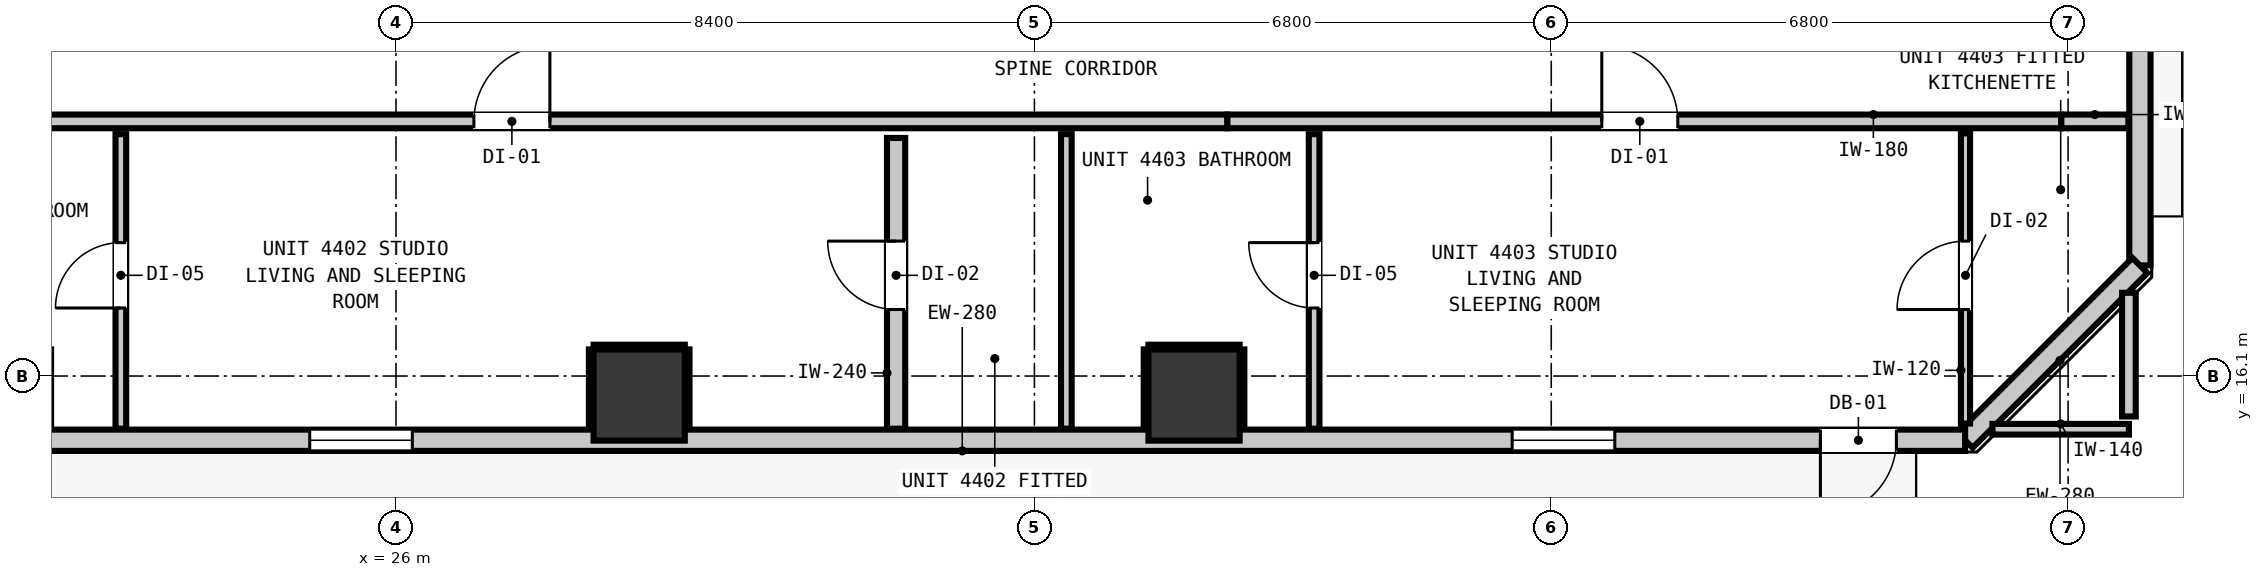
"""IFC4 building model, lengths in metres.
Left out: names, types, materials, properties, quantities, classifications, styles, units other than length and angle.
Written with IfcOpenShell. Run it as: python <this file> out.ifc"""

import sys

from ifc_helpers import new_model, si_unit, direction, frame, frame_2d, origin, origin_2d, place, context, subcontext, project, spatial, rectangle, extrude, element, fill, save


model = new_model("IFC4")
c1 = context("Model", 3, precision=1e-05, world=origin(), true_north=direction((0.0, 1.0)))
c2 = subcontext(c1, "Body", "Model", "MODEL_VIEW")
j1 = project(units=[si_unit("LENGTHUNIT", "METRE"), si_unit("PLANEANGLEUNIT", "RADIAN")], contexts=[c1])
p1 = place(None, origin())
s1 = spatial("IfcSite", under=j1, at=p1, CompositionType="ELEMENT")
p2 = place(p1, origin())
s2 = spatial("IfcBuilding", under=s1, at=p2, CompositionType="ELEMENT")
p3 = place(p2, frame((0.0, 0.0, 152.56)))
s3 = spatial("IfcBuildingStorey", under=s2, at=p3, CompositionType="ELEMENT", Elevation=152.56)
for number, where, z_axis, x_axis in (
    (1, (29.2, 15.85, 0.0), (0.0, 0.0, 1.0), (1.0, 0.0, 0.0)),
    (2, (36.5, 15.85, 0.0), (0.0, 0.0, 1.0), (1.0, 0.0, 0.0)),
):
    element("IfcColumn", number, at=place(p3, frame(where, z_axis=z_axis, x_axis=x_axis)), inside=s3, PredefinedType="COLUMN", context=c2, shape_type="SweptSolid", body=[
        extrude(rectangle(XDim=1.2, YDim=1.2, at=origin_2d()), origin(), (0.0, 0.0, 1.0), 3.32),
    ])
p4 = place(p3, frame((48.945, 49.845, 0.0), z_axis=(0.0, 0.0, 1.0), x_axis=(0.0, -1.0, 0.0)))
e3 = element("IfcWall", 3, at=p4, inside=s3, PredefinedType="STANDARD", context=c2, shape_type="SweptSolid", body=[
    extrude(rectangle(XDim=32.29, YDim=0.28, at=frame_2d((16.145, 0.0))), origin(), (0.0, 0.0, 1.0), 3.08),
])
p5 = place(p4, frame((0.904, 0.0, 0.0)))
e4 = element("IfcOpeningElement", 4, at=p5, cuts=e3, PredefinedType="OPENING", context=c2, shape_type="SweptSolid", body=[
    extrude(rectangle(XDim=1.0, YDim=2.15, at=frame_2d((0.5, 1.075))), frame((0.0, 0.15, 0.0), z_axis=(0.0, -1.0, 0.0), x_axis=(1.0, 0.0, 0.0)), (0.0, 0.0, 1.0), 0.3),
])
p6 = place(p4, frame((2.924, 0.0, 0.85)))
e5 = element("IfcOpeningElement", 5, at=p6, cuts=e3, PredefinedType="OPENING", context=c2, shape_type="SweptSolid", body=[
    extrude(rectangle(XDim=1.35, YDim=1.85, at=frame_2d((0.675, 0.925))), frame((0.0, 0.15, 0.0), z_axis=(0.0, -1.0, 0.0), x_axis=(1.0, 0.0, 0.0)), (0.0, 0.0, 1.0), 0.3),
])
p7 = place(p4, frame((21.186, 0.0, 0.85)))
e6 = element("IfcOpeningElement", 6, at=p7, cuts=e3, PredefinedType="OPENING", context=c2, shape_type="SweptSolid", body=[
    extrude(rectangle(XDim=1.35, YDim=1.85, at=frame_2d((0.675, 0.925))), frame((0.0, 0.15, 0.0), z_axis=(0.0, -1.0, 0.0), x_axis=(1.0, 0.0, 0.0)), (0.0, 0.0, 1.0), 0.3),
])
p8 = place(p4, frame((12.195, 0.0, 0.85)))
e7 = element("IfcOpeningElement", 7, at=p8, cuts=e3, PredefinedType="OPENING", context=c2, shape_type="SweptSolid", body=[
    extrude(rectangle(XDim=1.35, YDim=1.85, at=frame_2d((0.675, 0.925))), frame((0.0, 0.15, 0.0), z_axis=(0.0, -1.0, 0.0), x_axis=(1.0, 0.0, 0.0)), (0.0, 0.0, 1.0), 0.3),
])
p9 = place(p3, frame((48.945, 17.555, 0.0), z_axis=(0.0, 0.0, 1.0), x_axis=(-0.707106781187, -0.707106781187, 0.0)))
e8 = element("IfcWall", 8, at=p9, inside=s3, PredefinedType="STANDARD", context=c2, shape_type="SweptSolid", body=[
    extrude(rectangle(XDim=3.253, YDim=0.28, at=frame_2d((1.626, 0.0))), origin(), (0.0, 0.0, 1.0), 3.08),
])
p10 = place(p3, frame((46.645, 15.255, 0.0), z_axis=(0.0, 0.0, 1.0), x_axis=(-1.0, 0.0, 0.0)))
e9 = element("IfcWall", 9, at=p10, inside=s3, PredefinedType="STANDARD", context=c2, shape_type="SweptSolid", body=[
    extrude(rectangle(XDim=35.09, YDim=0.28, at=frame_2d((17.545, 0.0))), origin(), (0.0, 0.0, 1.0), 3.08),
])
p11 = place(p10, frame((0.904, 0.0, 0.0)))
e10 = element("IfcOpeningElement", 10, at=p11, cuts=e9, PredefinedType="OPENING", context=c2, shape_type="SweptSolid", body=[
    extrude(rectangle(XDim=1.0, YDim=2.15, at=frame_2d((0.5, 1.075))), frame((0.0, 0.15, 0.0), z_axis=(0.0, -1.0, 0.0), x_axis=(1.0, 0.0, 0.0)), (0.0, 0.0, 1.0), 0.3),
])
p12 = place(p10, frame((30.535, 0.0, 0.85)))
e11 = element("IfcOpeningElement", 11, at=p12, cuts=e9, PredefinedType="OPENING", context=c2, shape_type="SweptSolid", body=[
    extrude(rectangle(XDim=1.35, YDim=1.85, at=frame_2d((0.675, 0.925))), frame((0.0, 0.15, 0.0), z_axis=(0.0, -1.0, 0.0), x_axis=(1.0, 0.0, 0.0)), (0.0, 0.0, 1.0), 0.3),
])
p13 = place(p10, frame((20.43, 0.0, 0.85)))
e12 = element("IfcOpeningElement", 12, at=p13, cuts=e9, PredefinedType="OPENING", context=c2, shape_type="SweptSolid", body=[
    extrude(rectangle(XDim=1.35, YDim=1.85, at=frame_2d((0.675, 0.925))), frame((0.0, 0.15, 0.0), z_axis=(0.0, -1.0, 0.0), x_axis=(1.0, 0.0, 0.0)), (0.0, 0.0, 1.0), 0.3),
])
p14 = place(p10, frame((4.609, 0.0, 0.85)))
e13 = element("IfcOpeningElement", 13, at=p14, cuts=e9, PredefinedType="OPENING", context=c2, shape_type="SweptSolid", body=[
    extrude(rectangle(XDim=1.35, YDim=1.85, at=frame_2d((0.675, 0.925))), frame((0.0, 0.15, 0.0), z_axis=(0.0, -1.0, 0.0), x_axis=(1.0, 0.0, 0.0)), (0.0, 0.0, 1.0), 0.3),
])
p15 = place(p3, frame((9.407, 19.45, 0.0), z_axis=(0.0, 0.0, 1.0), x_axis=(1.0, 0.0, 0.0)))
e14 = element("IfcWall", 14, at=p15, inside=s3, PredefinedType="PARTITIONING", context=c2, shape_type="SweptSolid", body=[
    extrude(rectangle(XDim=27.532, YDim=0.18, at=frame_2d((13.766, 0.0))), origin(), (0.0, 0.0, 1.0), 3.08),
])
p16 = place(p15, frame((4.303, 0.0, 0.0)))
e15 = element("IfcOpeningElement", 15, at=p16, cuts=e14, PredefinedType="OPENING", context=c2, shape_type="SweptSolid", body=[
    extrude(rectangle(XDim=1.0, YDim=2.15, at=frame_2d((0.5, 1.075))), frame((0.0, 0.1, 0.0), z_axis=(0.0, -1.0, 0.0), x_axis=(1.0, 0.0, 0.0)), (0.0, 0.0, 1.0), 0.2),
])
p17 = place(p15, frame((17.618, 0.0, 0.0)))
e16 = element("IfcOpeningElement", 16, at=p17, cuts=e14, PredefinedType="OPENING", context=c2, shape_type="SweptSolid", body=[
    extrude(rectangle(XDim=1.0, YDim=2.15, at=frame_2d((0.5, 1.075))), frame((0.0, 0.1, 0.0), z_axis=(0.0, -1.0, 0.0), x_axis=(1.0, 0.0, 0.0)), (0.0, 0.0, 1.0), 0.2),
])
p18 = place(p3, frame((36.939, 19.45, 0.0), z_axis=(0.0, 0.0, 1.0), x_axis=(1.0, 0.0, 0.0)))
e17 = element("IfcWall", 17, at=p18, inside=s3, PredefinedType="PARTITIONING", context=c2, shape_type="SweptSolid", body=[
    extrude(rectangle(XDim=10.972, YDim=0.18, at=frame_2d((5.486, 0.0))), origin(), (0.0, 0.0, 1.0), 2.565),
])
p19 = place(p18, frame((4.926, 0.0, 0.0)))
e18 = element("IfcOpeningElement", 18, at=p19, cuts=e17, PredefinedType="OPENING", context=c2, shape_type="SweptSolid", body=[
    extrude(rectangle(XDim=1.0, YDim=2.15, at=frame_2d((0.5, 1.075))), frame((0.0, 0.1, 0.0), z_axis=(0.0, -1.0, 0.0), x_axis=(1.0, 0.0, 0.0)), (0.0, 0.0, 1.0), 0.2),
])
p20 = place(p3, frame((47.911, 19.45, 0.0), z_axis=(0.0, 0.0, 1.0), x_axis=(1.0, 0.0, 0.0)))
e19 = element("IfcWall", 19, at=p20, inside=s3, PredefinedType="PARTITIONING", context=c2, shape_type="SweptSolid", body=[
    extrude(rectangle(XDim=0.882, YDim=0.18, at=frame_2d((0.441, 0.0))), origin(), (0.0, 0.0, 1.0), 3.08),
])
p21 = place(p3, frame((47.005, 15.4, 0.0), z_axis=(0.0, 0.0, 1.0), x_axis=(1.0, 0.0, 0.0)))
e20 = element("IfcWall", 20, at=p21, inside=s3, PredefinedType="PARTITIONING", context=c2, shape_type="SweptSolid", body=[
    extrude(rectangle(XDim=1.795, YDim=0.14, at=frame_2d((0.897, 0.0))), origin(), (0.0, 0.0, 1.0), 3.08),
])
p22 = place(p3, frame((32.58, 15.407, 0.0), z_axis=(0.0, 0.0, 1.0), x_axis=(0.0, 1.0, 0.0)))
e21 = element("IfcWall", 21, at=p22, inside=s3, PredefinedType="PARTITIONING", context=c2, shape_type="SweptSolid", body=[
    extrude(rectangle(XDim=3.825, YDim=0.24, at=frame_2d((1.913, 0.0))), origin(), (0.0, 0.0, 1.0), 3.08),
])
p23 = place(p22, frame((1.568, 0.0, 0.0)))
e22 = element("IfcOpeningElement", 22, at=p23, cuts=e21, PredefinedType="OPENING", context=c2, shape_type="SweptSolid", body=[
    extrude(rectangle(XDim=0.9, YDim=2.1, at=frame_2d((0.45, 1.05))), frame((0.0, 0.13, 0.0), z_axis=(0.0, -1.0, 0.0), x_axis=(1.0, 0.0, 0.0)), (0.0, 0.0, 1.0), 0.26),
])
p24 = place(p3, frame((48.8, 15.568, 0.0), z_axis=(0.0, 0.0, 1.0), x_axis=(0.0, 1.0, 0.0)))
e23 = element("IfcWall", 23, at=p24, inside=s3, PredefinedType="PARTITIONING", context=c2, shape_type="SweptSolid", body=[
    extrude(rectangle(XDim=1.627, YDim=0.18, at=frame_2d((0.813, 0.0))), origin(), (0.0, 0.0, 1.0), 3.08),
])
p25 = place(p3, frame((22.38, 15.407, 0.0), z_axis=(0.0, 0.0, 1.0), x_axis=(0.0, 1.0, 0.0)))
e24 = element("IfcWall", 24, at=p25, inside=s3, PredefinedType="PARTITIONING", context=c2, shape_type="SweptSolid", body=[
    extrude(rectangle(XDim=3.875, YDim=0.14, at=frame_2d((1.938, 0.0))), origin(), (0.0, 0.0, 1.0), 3.08),
])
p26 = place(p25, frame((1.588, 0.0, 0.0)))
e25 = element("IfcOpeningElement", 25, at=p26, cuts=e24, PredefinedType="OPENING", context=c2, shape_type="SweptSolid", body=[
    extrude(rectangle(XDim=0.86, YDim=2.02, at=frame_2d((0.43, 1.01))), frame((0.0, 0.08, 0.0), z_axis=(0.0, -1.0, 0.0), x_axis=(1.0, 0.0, 0.0)), (0.0, 0.0, 1.0), 0.16),
])
p27 = place(p3, frame((34.82, 15.407, 0.0), z_axis=(0.0, 0.0, 1.0), x_axis=(0.0, 1.0, 0.0)))
e26 = element("IfcWall", 26, at=p27, inside=s3, PredefinedType="PARTITIONING", context=c2, shape_type="SweptSolid", body=[
    extrude(rectangle(XDim=3.875, YDim=0.14, at=frame_2d((1.938, 0.0))), origin(), (0.0, 0.0, 1.0), 3.08),
])
p28 = place(p3, frame((38.08, 15.407, 0.0), z_axis=(0.0, 0.0, 1.0), x_axis=(0.0, 1.0, 0.0)))
e27 = element("IfcWall", 27, at=p28, inside=s3, PredefinedType="PARTITIONING", context=c2, shape_type="SweptSolid", body=[
    extrude(rectangle(XDim=3.875, YDim=0.14, at=frame_2d((1.938, 0.0))), origin(), (0.0, 0.0, 1.0), 3.08),
])
p29 = place(p28, frame((1.588, 0.0, 0.0)))
e28 = element("IfcOpeningElement", 28, at=p29, cuts=e27, PredefinedType="OPENING", context=c2, shape_type="SweptSolid", body=[
    extrude(rectangle(XDim=0.86, YDim=2.02, at=frame_2d((0.43, 1.01))), frame((0.0, 0.08, 0.0), z_axis=(0.0, -1.0, 0.0), x_axis=(1.0, 0.0, 0.0)), (0.0, 0.0, 1.0), 0.16),
])
p30 = place(p3, frame((46.65, 15.475, 0.0), z_axis=(0.0, 0.0, 1.0), x_axis=(0.0, 1.0, 0.0)))
e29 = element("IfcWall", 29, at=p30, inside=s3, PredefinedType="PARTITIONING", context=c2, shape_type="SweptSolid", body=[
    extrude(rectangle(XDim=3.817, YDim=0.12, at=frame_2d((1.908, 0.0))), origin(), (0.0, 0.0, 1.0), 3.08),
])
p31 = place(p30, frame((1.5, 0.0, 0.0)))
e30 = element("IfcOpeningElement", 30, at=p31, cuts=e29, PredefinedType="OPENING", context=c2, shape_type="SweptSolid", body=[
    extrude(rectangle(XDim=0.9, YDim=2.1, at=frame_2d((0.45, 1.05))), frame((0.0, 0.07, 0.0), z_axis=(0.0, -1.0, 0.0), x_axis=(1.0, 0.0, 0.0)), (0.0, 0.0, 1.0), 0.14),
])
p32 = place(p3, frame((28.6, 16.482, 0.0), z_axis=(0.0, 0.0, 1.0), x_axis=(1.0, 0.0, 0.0)))
e31 = element("IfcWall", 31, at=p32, inside=s3, PredefinedType="PARTITIONING", context=c2, shape_type="SweptSolid", body=[
    extrude(rectangle(XDim=1.2, YDim=0.06, at=frame_2d((0.6, 0.0))), origin(), (0.0, 0.0, 1.0), 1.45),
])
for number, where, z_axis, x_axis in (
    (32, (28.568, 15.41, 0.0), (0.0, 0.0, 1.0), (0.0, 1.0, 0.0)),
    (33, (29.832, 15.41, 0.0), (0.0, 0.0, 1.0), (0.0, 1.0, 0.0)),
):
    element("IfcWall", number, at=place(p3, frame(where, z_axis=z_axis, x_axis=x_axis)), inside=s3, PredefinedType="PARTITIONING", context=c2, shape_type="SweptSolid", body=[
        extrude(rectangle(XDim=1.04, YDim=0.06, at=frame_2d((0.52, 0.0))), origin(), (0.0, 0.0, 1.0), 1.45),
    ])
p33 = place(p3, frame((35.9, 16.482, 0.0), z_axis=(0.0, 0.0, 1.0), x_axis=(1.0, 0.0, 0.0)))
e34 = element("IfcWall", 34, at=p33, inside=s3, PredefinedType="PARTITIONING", context=c2, shape_type="SweptSolid", body=[
    extrude(rectangle(XDim=1.2, YDim=0.06, at=frame_2d((0.6, 0.0))), origin(), (0.0, 0.0, 1.0), 1.45),
])
for number, where, z_axis, x_axis in (
    (35, (35.868, 15.41, 0.0), (0.0, 0.0, 1.0), (0.0, 1.0, 0.0)),
    (36, (37.132, 15.41, 0.0), (0.0, 0.0, 1.0), (0.0, 1.0, 0.0)),
):
    element("IfcWall", number, at=place(p3, frame(where, z_axis=z_axis, x_axis=x_axis)), inside=s3, PredefinedType="PARTITIONING", context=c2, shape_type="SweptSolid", body=[
        extrude(rectangle(XDim=1.04, YDim=0.06, at=frame_2d((0.52, 0.0))), origin(), (0.0, 0.0, 1.0), 1.45),
    ])
p34 = place(p11, origin())
e37 = element("IfcDoor", 37, at=p34, inside=s3, OperationType="SINGLE_SWING_RIGHT", PredefinedType="DOOR", context=c2, shape_type="SweptSolid", body=[
    extrude(rectangle(XDim=1.0, YDim=2.15, at=frame_2d((0.5, 1.075))), frame((0.0, 0.025, 0.0), z_axis=(0.0, -1.0, 0.0), x_axis=(1.0, 0.0, 0.0)), (0.0, 0.0, 1.0), 0.05),
])
fill(e10, e37)
p35 = place(p13, origin())
e38 = element("IfcWindow", 38, at=p35, inside=s3, PartitioningType="SINGLE_PANEL", PredefinedType="WINDOW", context=c2, shape_type="SweptSolid", body=[
    extrude(rectangle(XDim=1.35, YDim=1.85, at=frame_2d((0.675, 0.925))), frame((0.0, 0.03, 0.0), z_axis=(0.0, -1.0, 0.0), x_axis=(1.0, 0.0, 0.0)), (0.0, 0.0, 1.0), 0.06),
])
fill(e12, e38)
p36 = place(p14, origin())
e39 = element("IfcWindow", 39, at=p36, inside=s3, PartitioningType="SINGLE_PANEL", PredefinedType="WINDOW", context=c2, shape_type="SweptSolid", body=[
    extrude(rectangle(XDim=1.35, YDim=1.85, at=frame_2d((0.675, 0.925))), frame((0.0, 0.03, 0.0), z_axis=(0.0, -1.0, 0.0), x_axis=(1.0, 0.0, 0.0)), (0.0, 0.0, 1.0), 0.06),
])
fill(e13, e39)
p37 = place(p17, origin())
e40 = element("IfcDoor", 40, at=p37, inside=s3, OperationType="SINGLE_SWING_RIGHT", PredefinedType="DOOR", context=c2, shape_type="SweptSolid", body=[
    extrude(rectangle(XDim=1.0, YDim=2.15, at=frame_2d((0.5, 1.075))), frame((0.0, 0.025, 0.0), z_axis=(0.0, -1.0, 0.0), x_axis=(1.0, 0.0, 0.0)), (0.0, 0.0, 1.0), 0.05),
])
fill(e16, e40)
p38 = place(p26, origin())
e41 = element("IfcDoor", 41, at=p38, inside=s3, OperationType="SINGLE_SWING_LEFT", PredefinedType="DOOR", context=c2, shape_type="SweptSolid", body=[
    extrude(rectangle(XDim=0.86, YDim=2.02, at=frame_2d((0.43, 1.01))), frame((0.0, 0.025, 0.0), z_axis=(0.0, -1.0, 0.0), x_axis=(1.0, 0.0, 0.0)), (0.0, 0.0, 1.0), 0.05),
])
fill(e25, e41)
p39 = place(p23, origin())
e42 = element("IfcDoor", 42, at=p39, inside=s3, OperationType="SINGLE_SWING_RIGHT", PredefinedType="DOOR", context=c2, shape_type="SweptSolid", body=[
    extrude(rectangle(XDim=0.9, YDim=2.1, at=frame_2d((0.45, 1.05))), frame((0.0, 0.025, 0.0), z_axis=(0.0, -1.0, 0.0), x_axis=(1.0, 0.0, 0.0)), (0.0, 0.0, 1.0), 0.05),
])
fill(e22, e42)
p40 = place(p19, origin())
e43 = element("IfcDoor", 43, at=p40, inside=s3, OperationType="SINGLE_SWING_LEFT", PredefinedType="DOOR", context=c2, shape_type="SweptSolid", body=[
    extrude(rectangle(XDim=1.0, YDim=2.15, at=frame_2d((0.5, 1.075))), frame((0.0, 0.025, 0.0), z_axis=(0.0, -1.0, 0.0), x_axis=(1.0, 0.0, 0.0)), (0.0, 0.0, 1.0), 0.05),
])
fill(e18, e43)
p41 = place(p29, origin())
e44 = element("IfcDoor", 44, at=p41, inside=s3, OperationType="SINGLE_SWING_RIGHT", PredefinedType="DOOR", context=c2, shape_type="SweptSolid", body=[
    extrude(rectangle(XDim=0.86, YDim=2.02, at=frame_2d((0.43, 1.01))), frame((0.0, 0.025, 0.0), z_axis=(0.0, -1.0, 0.0), x_axis=(1.0, 0.0, 0.0)), (0.0, 0.0, 1.0), 0.05),
])
fill(e28, e44)
p42 = place(p31, origin())
e45 = element("IfcDoor", 45, at=p42, inside=s3, OperationType="SINGLE_SWING_LEFT", PredefinedType="DOOR", context=c2, shape_type="SweptSolid", body=[
    extrude(rectangle(XDim=0.9, YDim=2.1, at=frame_2d((0.45, 1.05))), frame((0.0, 0.025, 0.0), z_axis=(0.0, -1.0, 0.0), x_axis=(1.0, 0.0, 0.0)), (0.0, 0.0, 1.0), 0.05),
])
fill(e30, e45)
save(model, sys.argv[1])
